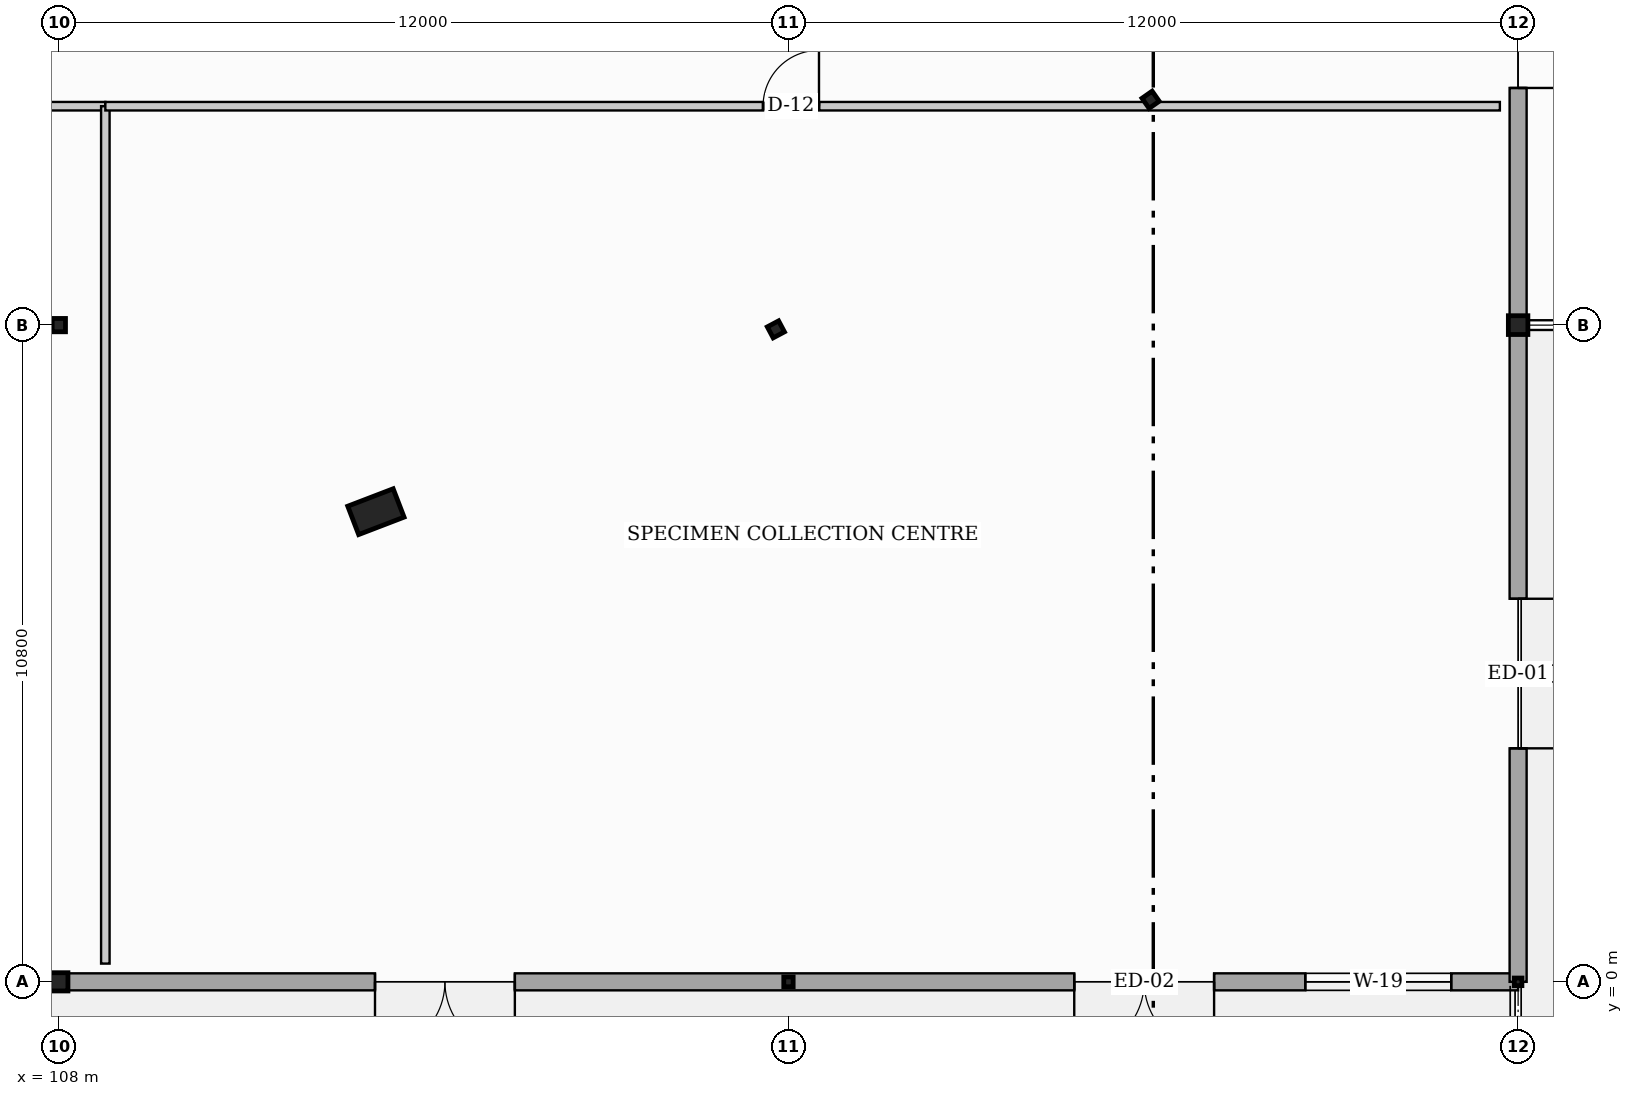
"""IFC4 building model, lengths in metres.
Left out: names, types, materials, properties, quantities, classifications, styles, units other than length and angle.
Written with IfcOpenShell. Run it as: python <this file> out.ifc"""

import sys

from ifc_helpers import new_model, si_unit, direction, frame, frame_2d, origin, origin_2d, place, context, subcontext, project, spatial, rectangle, hollow_rectangle, hollow_circle, i_section, extrude, element, fill, save


model = new_model("IFC4")
c1 = context("Model", 3, precision=1e-05, world=origin(), true_north=direction((0.0, 1.0)))
c2 = subcontext(c1, "Body", "Model", "MODEL_VIEW")
j1 = project(units=[si_unit("LENGTHUNIT", "METRE"), si_unit("PLANEANGLEUNIT", "RADIAN")], contexts=[c1])
p1 = place(None, origin())
s1 = spatial("IfcSite", under=j1, at=p1, CompositionType="ELEMENT")
p2 = place(p1, origin())
s2 = spatial("IfcBuilding", under=s1, at=p2, CompositionType="ELEMENT")
p3 = place(p2, origin())
s3 = spatial("IfcBuildingStorey", under=s2, at=p3, CompositionType="ELEMENT", Elevation=0.0)
p4 = place(p3, frame((108.0, 0.0, 0.0), z_axis=(0.0, 0.0, 1.0), x_axis=(0.0, 1.0, 0.0)))
e1 = element("IfcColumn", 1, at=p4, inside=s3, PredefinedType="COLUMN", context=c2, shape_type="SweptSolid", body=[
    extrude(hollow_rectangle(XDim=0.3, YDim=0.3, WallThickness=0.012, at=origin_2d()), origin(), (0.0, 0.0, 1.0), 4.8),
])
p5 = place(p3, frame((108.0, 10.8, 0.0), z_axis=(0.0, 0.0, 1.0), x_axis=(0.0, 1.0, 0.0)))
e2 = element("IfcColumn", 2, at=p5, inside=s3, PredefinedType="COLUMN", context=c2, shape_type="SweptSolid", body=[
    extrude(hollow_circle(Radius=0.11, WallThickness=0.01, at=origin_2d()), origin(), (0.0, 0.0, 1.0), 4.8),
])
p6 = place(p3, frame((120.0, 0.0, 0.0), z_axis=(0.0, 0.0, 1.0), x_axis=(1.0, 0.0, 0.0)))
e3 = element("IfcColumn", 3, at=p6, inside=s3, PredefinedType="COLUMN", context=c2, shape_type="SweptSolid", body=[
    extrude(i_section(OverallWidth=0.154, OverallDepth=0.162, WebThickness=0.008, FlangeThickness=0.011, at=origin_2d()), origin(), (0.0, 0.0, 1.0), 4.8),
])
p7 = place(p3, frame((132.0, 0.0, 0.0), z_axis=(0.0, 0.0, 1.0), x_axis=(0.0, 1.0, 0.0)))
e4 = element("IfcColumn", 4, at=p7, inside=s3, PredefinedType="COLUMN", context=c2, shape_type="SweptSolid", body=[
    extrude(hollow_rectangle(XDim=0.125, YDim=0.125, WallThickness=0.006, at=origin_2d()), origin(), (0.0, 0.0, 1.0), 4.8),
])
p8 = place(p3, frame((132.0, 10.8, 0.0), z_axis=(0.0, 0.0, 1.0), x_axis=(0.0, 1.0, 0.0)))
e5 = element("IfcColumn", 5, at=p8, inside=s3, PredefinedType="COLUMN", context=c2, shape_type="SweptSolid", body=[
    extrude(i_section(OverallWidth=0.309, OverallDepth=0.321, WebThickness=0.014, FlangeThickness=0.022, at=origin_2d()), origin(), (0.0, 0.0, 1.0), 4.8),
])
p9 = place(p3, frame((113.215, 7.732, 0.0), z_axis=(0.0, 0.0, 1.0), x_axis=(-0.358367949545, 0.933580426497, 0.0)))
e6 = element("IfcColumn", 6, at=p9, inside=s3, PredefinedType="PILASTER", context=c2, shape_type="SweptSolid", body=[
    extrude(rectangle(XDim=0.5, YDim=0.8, at=origin_2d()), origin(), (0.0, 0.0, 1.0), 4.8),
])
p10 = place(p3, frame((119.793, 10.73, 0.0), z_axis=(0.0, 0.0, 1.0), x_axis=(-0.469471562786, 0.882947592859, 0.0)))
e7 = element("IfcColumn", 7, at=p10, inside=s3, PredefinedType="COLUMN", context=c2, shape_type="SweptSolid", body=[
    extrude(i_section(OverallWidth=0.205, OverallDepth=0.21, WebThickness=0.009, FlangeThickness=0.014, at=origin_2d()), origin(), (0.0, 0.0, 1.0), 4.8),
])
p11 = place(p3, frame((125.956, 14.506, 0.0), z_axis=(0.0, 0.0, 1.0), x_axis=(-0.573576436351, 0.819152044289, 0.0)))
e8 = element("IfcColumn", 8, at=p11, inside=s3, PredefinedType="COLUMN", context=c2, shape_type="SweptSolid", body=[
    extrude(i_section(OverallWidth=0.203, OverallDepth=0.203, WebThickness=0.007, FlangeThickness=0.011, at=origin_2d()), origin(), (0.0, 0.0, 1.0), 4.8),
])
p12 = place(p3, frame((132.0, 0.0, 0.0), z_axis=(0.0, 0.0, 1.0), x_axis=(-1.0, 0.0, 0.0)))
e9 = element("IfcWall", 9, at=p12, inside=s3, PredefinedType="STANDARD", context=c2, shape_type="SweptSolid", body=[
    extrude(rectangle(XDim=36.0, YDim=0.28, at=frame_2d((18.0, 0.0))), origin(), (0.0, 0.0, 1.0), 3.53),
])
p13 = place(p12, frame((5.0, 0.0, 0.0)))
e10 = element("IfcOpeningElement", 10, at=p13, cuts=e9, PredefinedType="OPENING", context=c2, shape_type="SweptSolid", body=[
    extrude(rectangle(XDim=2.3, YDim=2.3, at=frame_2d((1.15, 1.15))), frame((0.0, 0.15, 0.0), z_axis=(0.0, -1.0, 0.0), x_axis=(1.0, 0.0, 0.0)), (0.0, 0.0, 1.0), 0.3),
])
p14 = place(p12, frame((16.5, 0.0, 0.0)))
e11 = element("IfcOpeningElement", 11, at=p14, cuts=e9, PredefinedType="OPENING", context=c2, shape_type="SweptSolid", body=[
    extrude(rectangle(XDim=2.3, YDim=2.3, at=frame_2d((1.15, 1.15))), frame((0.0, 0.15, 0.0), z_axis=(0.0, -1.0, 0.0), x_axis=(1.0, 0.0, 0.0)), (0.0, 0.0, 1.0), 0.3),
])
p15 = place(p12, frame((28.0, 0.0, 0.0)))
e12 = element("IfcOpeningElement", 12, at=p15, cuts=e9, PredefinedType="OPENING", context=c2, shape_type="SweptSolid", body=[
    extrude(rectangle(XDim=2.3, YDim=2.3, at=frame_2d((1.15, 1.15))), frame((0.0, 0.15, 0.0), z_axis=(0.0, -1.0, 0.0), x_axis=(1.0, 0.0, 0.0)), (0.0, 0.0, 1.0), 0.3),
])
p16 = place(p12, frame((1.1, 0.0, 0.95)))
e13 = element("IfcOpeningElement", 13, at=p16, cuts=e9, PredefinedType="OPENING", context=c2, shape_type="SweptSolid", body=[
    extrude(rectangle(XDim=2.4, YDim=0.9, at=frame_2d((1.2, 0.45))), frame((0.0, 0.15, 0.0), z_axis=(0.0, -1.0, 0.0), x_axis=(1.0, 0.0, 0.0)), (0.0, 0.0, 1.0), 0.3),
])
p17 = place(p12, frame((32.3, 0.0, 0.95)))
e14 = element("IfcOpeningElement", 14, at=p17, cuts=e9, PredefinedType="OPENING", context=c2, shape_type="SweptSolid", body=[
    extrude(rectangle(XDim=2.4, YDim=0.9, at=frame_2d((1.2, 0.45))), frame((0.0, 0.15, 0.0), z_axis=(0.0, -1.0, 0.0), x_axis=(1.0, 0.0, 0.0)), (0.0, 0.0, 1.0), 0.3),
])
p18 = place(p3, frame((132.0, 10.8, 0.0), z_axis=(0.0, 0.0, 1.0), x_axis=(0.0, -1.0, 0.0)))
e15 = element("IfcWall", 15, at=p18, inside=s3, PredefinedType="STANDARD", context=c2, shape_type="SweptSolid", body=[
    extrude(rectangle(XDim=10.8, YDim=0.28, at=frame_2d((5.4, 0.0))), origin(), (0.0, 0.0, 1.0), 3.53),
])
p19 = place(p18, frame((4.5, 0.0, 0.0)))
e16 = element("IfcOpeningElement", 16, at=p19, cuts=e15, PredefinedType="OPENING", context=c2, shape_type="SweptSolid", body=[
    extrude(rectangle(XDim=2.46, YDim=2.4, at=frame_2d((1.23, 1.2))), frame((0.0, 0.15, 0.0), z_axis=(0.0, -1.0, 0.0), x_axis=(1.0, 0.0, 0.0)), (0.0, 0.0, 1.0), 0.3),
])
p20 = place(p3, frame((132.0, 33.6, 0.0), z_axis=(0.0, 0.0, 1.0), x_axis=(0.0, -1.0, 0.0)))
e17 = element("IfcWall", 17, at=p20, inside=s3, PredefinedType="STANDARD", context=c2, shape_type="SweptSolid", body=[
    extrude(rectangle(XDim=22.8, YDim=0.28, at=frame_2d((11.4, 0.0))), origin(), (0.0, 0.0, 1.0), 3.53),
])
p21 = place(p20, frame((16.6, 0.0, 0.0)))
e18 = element("IfcOpeningElement", 18, at=p21, cuts=e17, PredefinedType="OPENING", context=c2, shape_type="SweptSolid", body=[
    extrude(rectangle(XDim=2.3, YDim=2.3, at=frame_2d((1.15, 1.15))), frame((0.0, 0.15, 0.0), z_axis=(0.0, -1.0, 0.0), x_axis=(1.0, 0.0, 0.0)), (0.0, 0.0, 1.0), 0.3),
])
p22 = place(p3, frame((104.8, 14.4, 0.0), z_axis=(0.0, 0.0, 1.0), x_axis=(1.0, 0.0, 0.0)))
e19 = element("IfcWall", 19, at=p22, inside=s3, PredefinedType="PARTITIONING", context=c2, shape_type="SweptSolid", body=[
    extrude(rectangle(XDim=3.965, YDim=0.14, at=frame_2d((1.982, 0.0))), origin(), (0.0, 0.0, 1.0), 4.445),
])
p23 = place(p22, frame((1.332, 0.0, 0.0)))
e20 = element("IfcOpeningElement", 20, at=p23, cuts=e19, PredefinedType="OPENING", context=c2, shape_type="SweptSolid", body=[
    extrude(rectangle(XDim=0.9, YDim=2.1, at=frame_2d((0.45, 1.05))), frame((0.0, 0.08, 0.0), z_axis=(0.0, -1.0, 0.0), x_axis=(1.0, 0.0, 0.0)), (0.0, 0.0, 1.0), 0.16),
])
p24 = place(p3, frame((108.765, 0.3, 0.0), z_axis=(0.0, 0.0, 1.0), x_axis=(0.0, 1.0, 0.0)))
e21 = element("IfcWall", 21, at=p24, inside=s3, PredefinedType="PARTITIONING", context=c2, shape_type="SweptSolid", body=[
    extrude(rectangle(XDim=14.1, YDim=0.14, at=frame_2d((7.05, 0.0))), origin(), (0.0, 0.0, 1.0), 4.027),
])
p25 = place(p3, frame((108.765, 14.4, 0.0), z_axis=(0.0, 0.0, 1.0), x_axis=(1.0, 0.0, 0.0)))
e22 = element("IfcWall", 22, at=p25, inside=s3, PredefinedType="PARTITIONING", context=c2, shape_type="SweptSolid", body=[
    extrude(rectangle(XDim=22.935, YDim=0.14, at=frame_2d((11.468, 0.0))), origin(), (0.0, 0.0, 1.0), 3.738),
])
p26 = place(p25, frame((10.817, 0.0, 0.0)))
e23 = element("IfcOpeningElement", 23, at=p26, cuts=e22, PredefinedType="OPENING", context=c2, shape_type="SweptSolid", body=[
    extrude(rectangle(XDim=0.92, YDim=2.04, at=frame_2d((0.46, 1.02))), frame((0.0, 0.08, 0.0), z_axis=(0.0, -1.0, 0.0), x_axis=(1.0, 0.0, 0.0)), (0.0, 0.0, 1.0), 0.16),
])
p27 = place(p13, origin())
e24 = element("IfcDoor", 24, at=p27, inside=s3, OperationType="DOUBLE_DOOR_SINGLE_SWING", PredefinedType="DOOR", context=c2, shape_type="SweptSolid", body=[
    extrude(rectangle(XDim=2.3, YDim=2.3, at=frame_2d((1.15, 1.15))), frame((0.0, 0.025, 0.0), z_axis=(0.0, -1.0, 0.0), x_axis=(1.0, 0.0, 0.0)), (0.0, 0.0, 1.0), 0.05),
])
fill(e10, e24)
p28 = place(p14, origin())
e25 = element("IfcDoor", 25, at=p28, inside=s3, OperationType="DOUBLE_DOOR_SINGLE_SWING", PredefinedType="DOOR", context=c2, shape_type="SweptSolid", body=[
    extrude(rectangle(XDim=2.3, YDim=2.3, at=frame_2d((1.15, 1.15))), frame((0.0, 0.025, 0.0), z_axis=(0.0, -1.0, 0.0), x_axis=(1.0, 0.0, 0.0)), (0.0, 0.0, 1.0), 0.05),
])
fill(e11, e25)
p29 = place(p16, origin())
e26 = element("IfcWindow", 26, at=p29, inside=s3, PartitioningType="DOUBLE_PANEL_HORIZONTAL", PredefinedType="WINDOW", context=c2, shape_type="SweptSolid", body=[
    extrude(rectangle(XDim=2.4, YDim=0.9, at=frame_2d((1.2, 0.45))), frame((0.0, 0.03, 0.0), z_axis=(0.0, -1.0, 0.0), x_axis=(1.0, 0.0, 0.0)), (0.0, 0.0, 1.0), 0.06),
])
fill(e13, e26)
p30 = place(p19, origin())
e27 = element("IfcDoor", 27, at=p30, inside=s3, OperationType="DOUBLE_DOOR_SINGLE_SWING", PredefinedType="DOOR", context=c2, shape_type="SweptSolid", body=[
    extrude(rectangle(XDim=2.46, YDim=2.4, at=frame_2d((1.23, 1.2))), frame((0.0, 0.025, 0.0), z_axis=(0.0, -1.0, 0.0), x_axis=(1.0, 0.0, 0.0)), (0.0, 0.0, 1.0), 0.05),
])
fill(e16, e27)
p31 = place(p21, origin())
e28 = element("IfcDoor", 28, at=p31, inside=s3, OperationType="DOUBLE_DOOR_SINGLE_SWING", PredefinedType="DOOR", context=c2, shape_type="SweptSolid", body=[
    extrude(rectangle(XDim=2.3, YDim=2.3, at=frame_2d((1.15, 1.15))), frame((0.0, 0.025, 0.0), z_axis=(0.0, -1.0, 0.0), x_axis=(1.0, 0.0, 0.0)), (0.0, 0.0, 1.0), 0.05),
])
fill(e18, e28)
p32 = place(p26, origin())
e29 = element("IfcDoor", 29, at=p32, inside=s3, OperationType="SINGLE_SWING_RIGHT", PredefinedType="DOOR", context=c2, shape_type="SweptSolid", body=[
    extrude(rectangle(XDim=0.92, YDim=2.04, at=frame_2d((0.46, 1.02))), frame((0.0, 0.025, 0.0), z_axis=(0.0, -1.0, 0.0), x_axis=(1.0, 0.0, 0.0)), (0.0, 0.0, 1.0), 0.05),
])
fill(e23, e29)
save(model, sys.argv[1])
